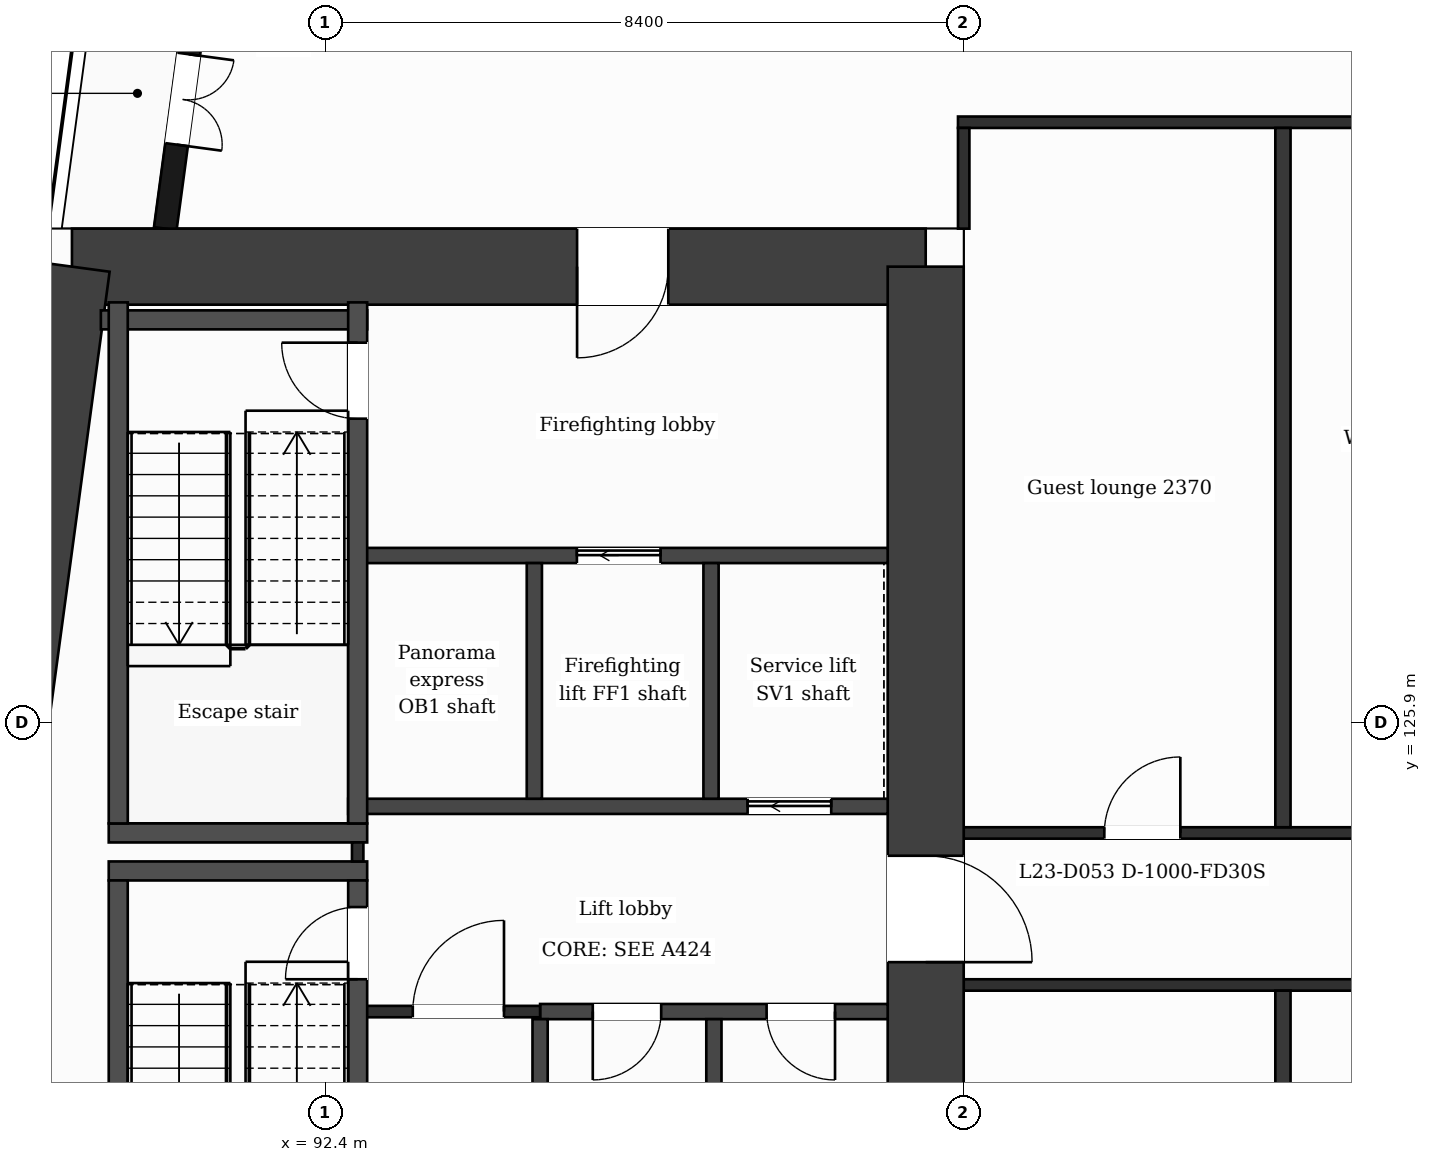
"""IFC4 building model, lengths in metres.
Left out: names, types, materials, properties, quantities, classifications, styles, units other than length and angle.
Written with IfcOpenShell. Run it as: python <this file> out.ifc"""

import sys

from ifc_helpers import new_model, si_unit, direction, frame, frame_2d, origin, place, context, subcontext, project, spatial, rectangle, extrude, element, fill, save


model = new_model("IFC4")
c1 = context("Model", 3, precision=1e-05, world=origin(), true_north=direction((0.0, 1.0)))
c2 = subcontext(c1, "Body", "Model", "MODEL_VIEW")
j1 = project(units=[si_unit("LENGTHUNIT", "METRE"), si_unit("PLANEANGLEUNIT", "RADIAN")], contexts=[c1])
p1 = place(None, origin())
s1 = spatial("IfcSite", under=j1, at=p1, CompositionType="ELEMENT")
p2 = place(p1, origin())
s2 = spatial("IfcBuilding", under=s1, at=p2, CompositionType="ELEMENT")
p3 = place(p2, frame((0.0, 0.0, 102.1)))
s3 = spatial("IfcBuildingStorey", under=s2, at=p3, CompositionType="ELEMENT", Elevation=102.1)
p4 = place(p3, frame((89.068, 131.9, 0.0), z_axis=(0.0, 0.0, 1.0), x_axis=(1.0, 0.0, 0.0)))
e1 = element("IfcWall", 1, at=p4, inside=s3, PredefinedType="SHEAR", context=c2, shape_type="SweptSolid", body=[
    extrude(rectangle(XDim=11.232, YDim=1.0, at=frame_2d((5.616, 0.0))), origin(), (0.0, 0.0, 1.0), 3.7),
])
p5 = place(p4, frame((6.646, 0.0, 0.0)))
e2 = element("IfcOpeningElement", 2, at=p5, cuts=e1, PredefinedType="OPENING", context=c2, shape_type="SweptSolid", body=[
    extrude(rectangle(XDim=1.2, YDim=2.1, at=frame_2d((0.6, 1.05))), frame((0.0, 0.51, 0.0), z_axis=(0.0, -1.0, 0.0), x_axis=(1.0, 0.0, 0.0)), (0.0, 0.0, 1.0), 1.02),
])
p6 = place(p3, frame((100.3, 131.9, 0.0), z_axis=(0.0, 0.0, 1.0), x_axis=(0.0, -1.0, 0.0)))
e3 = element("IfcWall", 3, at=p6, inside=s3, PredefinedType="SHEAR", context=c2, shape_type="SweptSolid", body=[
    extrude(rectangle(XDim=21.0, YDim=1.0, at=frame_2d((10.5, 0.0))), origin(), (0.0, 0.0, 1.0), 3.7),
])
p7 = place(p6, frame((7.75, 0.0, 0.0)))
e4 = element("IfcOpeningElement", 4, at=p7, cuts=e3, PredefinedType="OPENING", context=c2, shape_type="SweptSolid", body=[
    extrude(rectangle(XDim=1.4, YDim=2.1, at=frame_2d((0.7, 1.05))), frame((0.0, 0.51, 0.0), z_axis=(0.0, -1.0, 0.0), x_axis=(1.0, 0.0, 0.0)), (0.0, 0.0, 1.0), 1.02),
])
p8 = place(p3, frame((86.241, 110.9, 0.0), z_axis=(0.0, 0.0, 1.0), x_axis=(0.133411141623, 0.991060778808, 0.0)))
e5 = element("IfcWall", 5, at=p8, inside=s3, PredefinedType="SHEAR", context=c2, shape_type="SweptSolid", body=[
    extrude(rectangle(XDim=21.189, YDim=1.0, at=frame_2d((10.595, 0.0))), origin(), (0.0, 0.0, 1.0), 3.7),
])
p9 = place(p3, frame((91.177, 138.95, 0.0), z_axis=(0.0, 0.0, 1.0), x_axis=(-0.133426664613, -0.991058689065, 0.0)))
e6 = element("IfcWall", 6, at=p9, inside=s3, PredefinedType="SOLIDWALL", context=c2, shape_type="SweptSolid", body=[
    extrude(rectangle(XDim=6.609, YDim=0.3, at=frame_2d((3.305, 0.0))), origin(), (0.0, 0.0, 1.0), 3.38),
])
p10 = place(p9, frame((1.039, 0.0, 0.9)))
e7 = element("IfcOpeningElement", 7, at=p10, cuts=e6, PredefinedType="OPENING", context=c2, shape_type="SweptSolid", body=[
    extrude(rectangle(XDim=1.2, YDim=2.1, at=frame_2d((0.6, 1.05))), frame((0.0, 0.16, 0.0), z_axis=(0.0, -1.0, 0.0), x_axis=(1.0, 0.0, 0.0)), (0.0, 0.0, 1.0), 0.32),
])
p11 = place(p9, frame((4.294, 0.0, 0.0)))
e8 = element("IfcOpeningElement", 8, at=p11, cuts=e6, PredefinedType="OPENING", context=c2, shape_type="SweptSolid", body=[
    extrude(rectangle(XDim=1.2, YDim=2.4, at=frame_2d((0.6, 1.2))), frame((0.0, 0.16, 0.0), z_axis=(0.0, -1.0, 0.0), x_axis=(1.0, 0.0, 0.0)), (0.0, 0.0, 1.0), 0.32),
])
p12 = place(p3, frame((95.227, 122.1, 0.0), z_axis=(0.0, 0.0, 1.0), x_axis=(1.0, 0.0, 0.0)))
e9 = element("IfcWall", 9, at=p12, inside=s3, PredefinedType="PARTITIONING", context=c2, shape_type="SweptSolid", body=[
    extrude(rectangle(XDim=4.573, YDim=0.2, at=frame_2d((2.287, 0.0))), origin(), (0.0, 0.0, 1.0), 3.38),
])
p13 = place(p12, frame((0.693, 0.0, 0.0)))
e10 = element("IfcOpeningElement", 10, at=p13, cuts=e9, PredefinedType="OPENING", context=c2, shape_type="SweptSolid", body=[
    extrude(rectangle(XDim=0.9, YDim=2.1, at=frame_2d((0.45, 1.05))), frame((0.0, 0.11, 0.0), z_axis=(0.0, -1.0, 0.0), x_axis=(1.0, 0.0, 0.0)), (0.0, 0.0, 1.0), 0.22),
])
p14 = place(p12, frame((2.98, 0.0, 0.0)))
e11 = element("IfcOpeningElement", 11, at=p14, cuts=e9, PredefinedType="OPENING", context=c2, shape_type="SweptSolid", body=[
    extrude(rectangle(XDim=0.9, YDim=2.1, at=frame_2d((0.45, 1.05))), frame((0.0, 0.11, 0.0), z_axis=(0.0, -1.0, 0.0), x_axis=(1.0, 0.0, 0.0)), (0.0, 0.0, 1.0), 0.22),
])
p15 = place(p3, frame((92.827, 122.1, 0.0), z_axis=(0.0, 0.0, 1.0), x_axis=(1.0, 0.0, 0.0)))
e12 = element("IfcWall", 12, at=p15, inside=s3, PredefinedType="PARTITIONING", context=c2, shape_type="SweptSolid", body=[
    extrude(rectangle(XDim=2.4, YDim=0.15, at=frame_2d((1.2, 0.0))), origin(), (0.0, 0.0, 1.0), 3.38),
])
p16 = place(p15, frame((0.725, 0.0, 0.0)))
e13 = element("IfcOpeningElement", 13, at=p16, cuts=e12, PredefinedType="OPENING", context=c2, shape_type="SweptSolid", body=[
    extrude(rectangle(XDim=1.2, YDim=2.1, at=frame_2d((0.6, 1.05))), frame((0.0, 0.085, 0.0), z_axis=(0.0, -1.0, 0.0), x_axis=(1.0, 0.0, 0.0)), (0.0, 0.0, 1.0), 0.17),
])
p17 = place(p3, frame((100.8, 122.45, 0.0), z_axis=(0.0, 0.0, 1.0), x_axis=(1.0, 0.0, 0.0)))
e14 = element("IfcWall", 14, at=p17, inside=s3, PredefinedType="PARTITIONING", context=c2, shape_type="SweptSolid", body=[
    extrude(rectangle(XDim=25.2, YDim=0.15, at=frame_2d((12.6, 0.0))), origin(), (0.0, 0.0, 1.0), 3.38),
])
for number, where, z_axis, x_axis in (
    (15, (89.552, 123.95, 0.0), (0.0, 0.0, 1.0), (1.0, 0.0, 0.0)),
    (16, (89.552, 124.45, 0.0), (0.0, 0.0, 1.0), (1.0, 0.0, 0.0)),
):
    element("IfcWall", number, at=place(p3, frame(where, z_axis=z_axis, x_axis=x_axis)), inside=s3, PredefinedType="PARTITIONING", context=c2, shape_type="SweptSolid", body=[
        extrude(rectangle(XDim=3.4, YDim=0.25, at=frame_2d((1.7, 0.0))), origin(), (0.0, 0.0, 1.0), 3.38),
    ])
p18 = place(p3, frame((100.8, 124.45, 0.0), z_axis=(0.0, 0.0, 1.0), x_axis=(1.0, 0.0, 0.0)))
e17 = element("IfcWall", 17, at=p18, inside=s3, PredefinedType="PARTITIONING", context=c2, shape_type="SweptSolid", body=[
    extrude(rectangle(XDim=25.2, YDim=0.15, at=frame_2d((12.6, 0.0))), origin(), (0.0, 0.0, 1.0), 3.38),
])
p19 = place(p18, frame((1.85, 0.0, 0.0)))
e18 = element("IfcOpeningElement", 18, at=p19, cuts=e17, PredefinedType="OPENING", context=c2, shape_type="SweptSolid", body=[
    extrude(rectangle(XDim=1.0, YDim=2.1, at=frame_2d((0.5, 1.05))), frame((0.0, 0.085, 0.0), z_axis=(0.0, -1.0, 0.0), x_axis=(1.0, 0.0, 0.0)), (0.0, 0.0, 1.0), 0.17),
])
p20 = place(p18, frame((6.425, 0.0, 0.0)))
e19 = element("IfcOpeningElement", 19, at=p20, cuts=e17, PredefinedType="OPENING", context=c2, shape_type="SweptSolid", body=[
    extrude(rectangle(XDim=1.0, YDim=2.1, at=frame_2d((0.5, 1.05))), frame((0.0, 0.085, 0.0), z_axis=(0.0, -1.0, 0.0), x_axis=(1.0, 0.0, 0.0)), (0.0, 0.0, 1.0), 0.17),
])
p21 = place(p18, frame((10.0, 0.0, 0.0)))
e20 = element("IfcOpeningElement", 20, at=p21, cuts=e17, PredefinedType="OPENING", context=c2, shape_type="SweptSolid", body=[
    extrude(rectangle(XDim=1.0, YDim=2.1, at=frame_2d((0.5, 1.05))), frame((0.0, 0.085, 0.0), z_axis=(0.0, -1.0, 0.0), x_axis=(1.0, 0.0, 0.0)), (0.0, 0.0, 1.0), 0.17),
])
p22 = place(p18, frame((14.2, 0.0, 0.0)))
e21 = element("IfcOpeningElement", 21, at=p22, cuts=e17, PredefinedType="OPENING", context=c2, shape_type="SweptSolid", body=[
    extrude(rectangle(XDim=1.0, YDim=2.1, at=frame_2d((0.5, 1.05))), frame((0.0, 0.085, 0.0), z_axis=(0.0, -1.0, 0.0), x_axis=(1.0, 0.0, 0.0)), (0.0, 0.0, 1.0), 0.17),
])
p23 = place(p18, frame((17.8, 0.0, 0.0)))
e22 = element("IfcOpeningElement", 22, at=p23, cuts=e17, PredefinedType="OPENING", context=c2, shape_type="SweptSolid", body=[
    extrude(rectangle(XDim=1.0, YDim=2.1, at=frame_2d((0.5, 1.05))), frame((0.0, 0.085, 0.0), z_axis=(0.0, -1.0, 0.0), x_axis=(1.0, 0.0, 0.0)), (0.0, 0.0, 1.0), 0.17),
])
p24 = place(p18, frame((22.85, 0.0, 0.0)))
e23 = element("IfcOpeningElement", 23, at=p24, cuts=e17, PredefinedType="OPENING", context=c2, shape_type="SweptSolid", body=[
    extrude(rectangle(XDim=1.0, YDim=2.1, at=frame_2d((0.5, 1.05))), frame((0.0, 0.085, 0.0), z_axis=(0.0, -1.0, 0.0), x_axis=(1.0, 0.0, 0.0)), (0.0, 0.0, 1.0), 0.17),
])
p25 = place(p3, frame((92.702, 124.8, 0.0), z_axis=(0.0, 0.0, 1.0), x_axis=(1.0, 0.0, 0.0)))
e24 = element("IfcWall", 24, at=p25, inside=s3, PredefinedType="PARTITIONING", context=c2, shape_type="SweptSolid", body=[
    extrude(rectangle(XDim=7.098, YDim=0.2, at=frame_2d((3.549, 0.0))), origin(), (0.0, 0.0, 1.0), 3.38),
])
p26 = place(p25, frame((5.255, 0.0, 0.0)))
e25 = element("IfcOpeningElement", 25, at=p26, cuts=e24, PredefinedType="OPENING", context=c2, shape_type="SweptSolid", body=[
    extrude(rectangle(XDim=1.1, YDim=2.1, at=frame_2d((0.55, 1.05))), frame((0.0, 0.11, 0.0), z_axis=(0.0, -1.0, 0.0), x_axis=(1.0, 0.0, 0.0)), (0.0, 0.0, 1.0), 0.22),
])
p27 = place(p3, frame((92.827, 128.1, 0.0), z_axis=(0.0, 0.0, 1.0), x_axis=(1.0, 0.0, 0.0)))
e26 = element("IfcWall", 26, at=p27, inside=s3, PredefinedType="PARTITIONING", context=c2, shape_type="SweptSolid", body=[
    extrude(rectangle(XDim=6.973, YDim=0.2, at=frame_2d((3.487, 0.0))), origin(), (0.0, 0.0, 1.0), 3.38),
])
p28 = place(p27, frame((2.884, 0.0, 0.0)))
e27 = element("IfcOpeningElement", 27, at=p28, cuts=e26, PredefinedType="OPENING", context=c2, shape_type="SweptSolid", body=[
    extrude(rectangle(XDim=1.1, YDim=2.1, at=frame_2d((0.55, 1.05))), frame((0.0, 0.11, 0.0), z_axis=(0.0, -1.0, 0.0), x_axis=(1.0, 0.0, 0.0)), (0.0, 0.0, 1.0), 0.22),
])
p29 = place(p3, frame((89.448, 131.2, 0.0), z_axis=(0.0, 0.0, 1.0), x_axis=(1.0, 0.0, 0.0)))
e28 = element("IfcWall", 28, at=p29, inside=s3, PredefinedType="PARTITIONING", context=c2, shape_type="SweptSolid", body=[
    extrude(rectangle(XDim=3.504, YDim=0.25, at=frame_2d((1.752, 0.0))), origin(), (0.0, 0.0, 1.0), 3.38),
])
p30 = place(p3, frame((100.725, 133.8, 0.0), z_axis=(0.0, 0.0, 1.0), x_axis=(1.0, 0.0, 0.0)))
e29 = element("IfcWall", 29, at=p30, inside=s3, PredefinedType="PARTITIONING", context=c2, shape_type="SweptSolid", body=[
    extrude(rectangle(XDim=25.35, YDim=0.15, at=frame_2d((12.675, 0.0))), origin(), (0.0, 0.0, 1.0), 3.38),
])
p31 = place(p30, frame((18.225, 0.0, 0.0)))
e30 = element("IfcOpeningElement", 30, at=p31, cuts=e29, PredefinedType="OPENING", context=c2, shape_type="SweptSolid", body=[
    extrude(rectangle(XDim=1.0, YDim=2.1, at=frame_2d((0.5, 1.05))), frame((0.0, 0.085, 0.0), z_axis=(0.0, -1.0, 0.0), x_axis=(1.0, 0.0, 0.0)), (0.0, 0.0, 1.0), 0.17),
])
for number, where, z_axis, x_axis in (
    (31, (89.677, 116.97, 0.0), (0.0, 0.0, 1.0), (0.0, 1.0, 0.0)),
    (32, (89.677, 124.575, 0.0), (0.0, 0.0, 1.0), (0.0, 1.0, 0.0)),
):
    element("IfcWall", number, at=place(p3, frame(where, z_axis=z_axis, x_axis=x_axis)), inside=s3, PredefinedType="PARTITIONING", context=c2, shape_type="SweptSolid", body=[
        extrude(rectangle(XDim=6.855, YDim=0.25, at=frame_2d((3.427, 0.0))), origin(), (0.0, 0.0, 1.0), 3.38),
    ])
p32 = place(p3, frame((92.827, 124.075, 0.0), z_axis=(0.0, 0.0, 1.0), x_axis=(0.0, 1.0, 0.0)))
e33 = element("IfcWall", 33, at=p32, inside=s3, PredefinedType="PARTITIONING", context=c2, shape_type="SweptSolid", body=[
    extrude(rectangle(XDim=0.25, YDim=0.15, at=frame_2d((0.125, 0.0))), origin(), (0.0, 0.0, 1.0), 3.38),
])
p33 = place(p3, frame((92.827, 116.97, 0.0), z_axis=(0.0, 0.0, 1.0), x_axis=(0.0, 1.0, 0.0)))
e34 = element("IfcWall", 34, at=p33, inside=s3, PredefinedType="PARTITIONING", context=c2, shape_type="SweptSolid", body=[
    extrude(rectangle(XDim=6.855, YDim=0.25, at=frame_2d((3.427, 0.0))), origin(), (0.0, 0.0, 1.0), 3.38),
])
p34 = place(p33, frame((5.555, 0.0, 0.0)))
e35 = element("IfcOpeningElement", 35, at=p34, cuts=e34, PredefinedType="OPENING", context=c2, shape_type="SweptSolid", body=[
    extrude(rectangle(XDim=0.95, YDim=2.1, at=frame_2d((0.475, 1.05))), frame((0.0, 0.135, 0.0), z_axis=(0.0, -1.0, 0.0), x_axis=(1.0, 0.0, 0.0)), (0.0, 0.0, 1.0), 0.27),
])
p35 = place(p3, frame((92.827, 124.575, 0.0), z_axis=(0.0, 0.0, 1.0), x_axis=(0.0, 1.0, 0.0)))
e36 = element("IfcWall", 36, at=p35, inside=s3, PredefinedType="PARTITIONING", context=c2, shape_type="SweptSolid", body=[
    extrude(rectangle(XDim=6.855, YDim=0.25, at=frame_2d((3.427, 0.0))), origin(), (0.0, 0.0, 1.0), 3.38),
])
p36 = place(p35, frame((5.325, 0.0, 0.0)))
e37 = element("IfcOpeningElement", 37, at=p36, cuts=e36, PredefinedType="OPENING", context=c2, shape_type="SweptSolid", body=[
    extrude(rectangle(XDim=1.0, YDim=2.1, at=frame_2d((0.5, 1.05))), frame((0.0, 0.135, 0.0), z_axis=(0.0, -1.0, 0.0), x_axis=(1.0, 0.0, 0.0)), (0.0, 0.0, 1.0), 0.27),
])
p37 = place(p3, frame((95.151, 124.9, 0.0), z_axis=(0.0, 0.0, 1.0), x_axis=(0.0, 1.0, 0.0)))
e38 = element("IfcWall", 38, at=p37, inside=s3, PredefinedType="PARTITIONING", context=c2, shape_type="SweptSolid", body=[
    extrude(rectangle(XDim=3.1, YDim=0.2, at=frame_2d((1.55, 0.0))), origin(), (0.0, 0.0, 1.0), 3.38),
])
p38 = place(p3, frame((95.227, 116.97, 0.0), z_axis=(0.0, 0.0, 1.0), x_axis=(0.0, 1.0, 0.0)))
e39 = element("IfcWall", 39, at=p38, inside=s3, PredefinedType="PARTITIONING", context=c2, shape_type="SweptSolid", body=[
    extrude(rectangle(XDim=5.03, YDim=0.2, at=frame_2d((2.515, 0.0))), origin(), (0.0, 0.0, 1.0), 3.38),
])
p39 = place(p38, frame((0.58, 0.0, 0.0)))
e40 = element("IfcOpeningElement", 40, at=p39, cuts=e39, PredefinedType="OPENING", context=c2, shape_type="SweptSolid", body=[
    extrude(rectangle(XDim=0.9, YDim=2.1, at=frame_2d((0.45, 1.05))), frame((0.0, 0.11, 0.0), z_axis=(0.0, -1.0, 0.0), x_axis=(1.0, 0.0, 0.0)), (0.0, 0.0, 1.0), 0.22),
])
for number, where, z_axis, x_axis in (
    (41, (97.476, 124.9, 0.0), (0.0, 0.0, 1.0), (0.0, 1.0, 0.0)),
    (42, (97.513, 118.9, 0.0), (0.0, 0.0, 1.0), (0.0, 1.0, 0.0)),
):
    element("IfcWall", number, at=place(p3, frame(where, z_axis=z_axis, x_axis=x_axis)), inside=s3, PredefinedType="PARTITIONING", context=c2, shape_type="SweptSolid", body=[
        extrude(rectangle(XDim=3.1, YDim=0.2, at=frame_2d((1.55, 0.0))), origin(), (0.0, 0.0, 1.0), 3.38),
    ])
p40 = place(p3, frame((100.8, 132.4, 0.0), z_axis=(0.0, 0.0, 1.0), x_axis=(0.0, 1.0, 0.0)))
e43 = element("IfcWall", 43, at=p40, inside=s3, PredefinedType="PARTITIONING", context=c2, shape_type="SweptSolid", body=[
    extrude(rectangle(XDim=1.325, YDim=0.15, at=frame_2d((0.663, 0.0))), origin(), (0.0, 0.0, 1.0), 3.38),
])
p41 = place(p3, frame((105.0, 109.075, 0.0), z_axis=(0.0, 0.0, 1.0), x_axis=(0.0, 1.0, 0.0)))
e44 = element("IfcWall", 44, at=p41, inside=s3, PredefinedType="PARTITIONING", context=c2, shape_type="SweptSolid", body=[
    extrude(rectangle(XDim=13.3, YDim=0.2, at=frame_2d((6.65, 0.0))), origin(), (0.0, 0.0, 1.0), 3.38),
])
p42 = place(p3, frame((105.0, 124.525, 0.0), z_axis=(0.0, 0.0, 1.0), x_axis=(0.0, 1.0, 0.0)))
e45 = element("IfcWall", 45, at=p42, inside=s3, PredefinedType="PARTITIONING", context=c2, shape_type="SweptSolid", body=[
    extrude(rectangle(XDim=9.2, YDim=0.2, at=frame_2d((4.6, 0.0))), origin(), (0.0, 0.0, 1.0), 3.38),
])
p43 = place(p11, origin())
e46 = element("IfcDoor", 46, at=p43, inside=s3, OperationType="DOUBLE_DOOR_SINGLE_SWING", PredefinedType="DOOR", context=c2, shape_type="SweptSolid", body=[
    extrude(rectangle(XDim=1.2, YDim=2.4, at=frame_2d((0.6, 1.2))), frame((0.0, 0.025, 0.0), z_axis=(0.0, -1.0, 0.0), x_axis=(1.0, 0.0, 0.0)), (0.0, 0.0, 1.0), 0.05),
])
fill(e8, e46)
p44 = place(p16, origin())
e47 = element("IfcDoor", 47, at=p44, inside=s3, OperationType="SINGLE_SWING_RIGHT", PredefinedType="DOOR", context=c2, shape_type="SweptSolid", body=[
    extrude(rectangle(XDim=1.2, YDim=2.1, at=frame_2d((0.6, 1.05))), frame((0.0, 0.025, 0.0), z_axis=(0.0, -1.0, 0.0), x_axis=(1.0, 0.0, 0.0)), (0.0, 0.0, 1.0), 0.05),
])
fill(e13, e47)
p45 = place(p28, origin())
e48 = element("IfcDoor", 48, at=p45, inside=s3, OperationType="SLIDING_TO_LEFT", PredefinedType="DOOR", context=c2, shape_type="SweptSolid", body=[
    extrude(rectangle(XDim=1.1, YDim=2.1, at=frame_2d((0.55, 1.05))), frame((0.0, 0.025, 0.0), z_axis=(0.0, -1.0, 0.0), x_axis=(1.0, 0.0, 0.0)), (0.0, 0.0, 1.0), 0.05),
])
fill(e27, e48)
p46 = place(p26, origin())
e49 = element("IfcDoor", 49, at=p46, inside=s3, OperationType="SLIDING_TO_LEFT", PredefinedType="DOOR", context=c2, shape_type="SweptSolid", body=[
    extrude(rectangle(XDim=1.1, YDim=2.1, at=frame_2d((0.55, 1.05))), frame((0.0, 0.025, 0.0), z_axis=(0.0, -1.0, 0.0), x_axis=(1.0, 0.0, 0.0)), (0.0, 0.0, 1.0), 0.05),
])
fill(e25, e49)
p47 = place(p13, origin())
e50 = element("IfcDoor", 50, at=p47, inside=s3, OperationType="SINGLE_SWING_LEFT", PredefinedType="DOOR", context=c2, shape_type="SweptSolid", body=[
    extrude(rectangle(XDim=0.9, YDim=2.1, at=frame_2d((0.45, 1.05))), frame((0.0, 0.025, 0.0), z_axis=(0.0, -1.0, 0.0), x_axis=(1.0, 0.0, 0.0)), (0.0, 0.0, 1.0), 0.05),
])
fill(e10, e50)
p48 = place(p14, origin())
e51 = element("IfcDoor", 51, at=p48, inside=s3, OperationType="SINGLE_SWING_RIGHT", PredefinedType="DOOR", context=c2, shape_type="SweptSolid", body=[
    extrude(rectangle(XDim=0.9, YDim=2.1, at=frame_2d((0.45, 1.05))), frame((0.0, 0.025, 0.0), z_axis=(0.0, -1.0, 0.0), x_axis=(1.0, 0.0, 0.0)), (0.0, 0.0, 1.0), 0.05),
])
fill(e11, e51)
p49 = place(p34, origin())
e52 = element("IfcDoor", 52, at=p49, inside=s3, OperationType="SINGLE_SWING_LEFT", PredefinedType="DOOR", context=c2, shape_type="SweptSolid", body=[
    extrude(rectangle(XDim=0.95, YDim=2.1, at=frame_2d((0.475, 1.05))), frame((0.0, 0.025, 0.0), z_axis=(0.0, -1.0, 0.0), x_axis=(1.0, 0.0, 0.0)), (0.0, 0.0, 1.0), 0.05),
])
fill(e35, e52)
p50 = place(p36, origin())
e53 = element("IfcDoor", 53, at=p50, inside=s3, OperationType="SINGLE_SWING_RIGHT", PredefinedType="DOOR", context=c2, shape_type="SweptSolid", body=[
    extrude(rectangle(XDim=1.0, YDim=2.1, at=frame_2d((0.5, 1.05))), frame((0.0, 0.025, 0.0), z_axis=(0.0, -1.0, 0.0), x_axis=(1.0, 0.0, 0.0)), (0.0, 0.0, 1.0), 0.05),
])
fill(e37, e53)
p51 = place(p19, origin())
e54 = element("IfcDoor", 54, at=p51, inside=s3, OperationType="SINGLE_SWING_RIGHT", PredefinedType="DOOR", context=c2, shape_type="SweptSolid", body=[
    extrude(rectangle(XDim=1.0, YDim=2.1, at=frame_2d((0.5, 1.05))), frame((0.0, 0.025, 0.0), z_axis=(0.0, -1.0, 0.0), x_axis=(1.0, 0.0, 0.0)), (0.0, 0.0, 1.0), 0.05),
])
fill(e18, e54)
p52 = place(p5, origin())
e55 = element("IfcDoor", 55, at=p52, inside=s3, OperationType="SINGLE_SWING_LEFT", PredefinedType="DOOR", context=c2, shape_type="SweptSolid", body=[
    extrude(rectangle(XDim=1.2, YDim=2.1, at=frame_2d((0.6, 1.05))), frame((0.0, 0.025, 0.0), z_axis=(0.0, -1.0, 0.0), x_axis=(1.0, 0.0, 0.0)), (0.0, 0.0, 1.0), 0.05),
])
fill(e2, e55)
p53 = place(p7, origin())
e56 = element("IfcDoor", 56, at=p53, inside=s3, OperationType="SINGLE_SWING_RIGHT", PredefinedType="DOOR", context=c2, shape_type="SweptSolid", body=[
    extrude(rectangle(XDim=1.4, YDim=2.1, at=frame_2d((0.7, 1.05))), frame((0.0, 0.025, 0.0), z_axis=(0.0, -1.0, 0.0), x_axis=(1.0, 0.0, 0.0)), (0.0, 0.0, 1.0), 0.05),
])
fill(e4, e56)
save(model, sys.argv[1])
